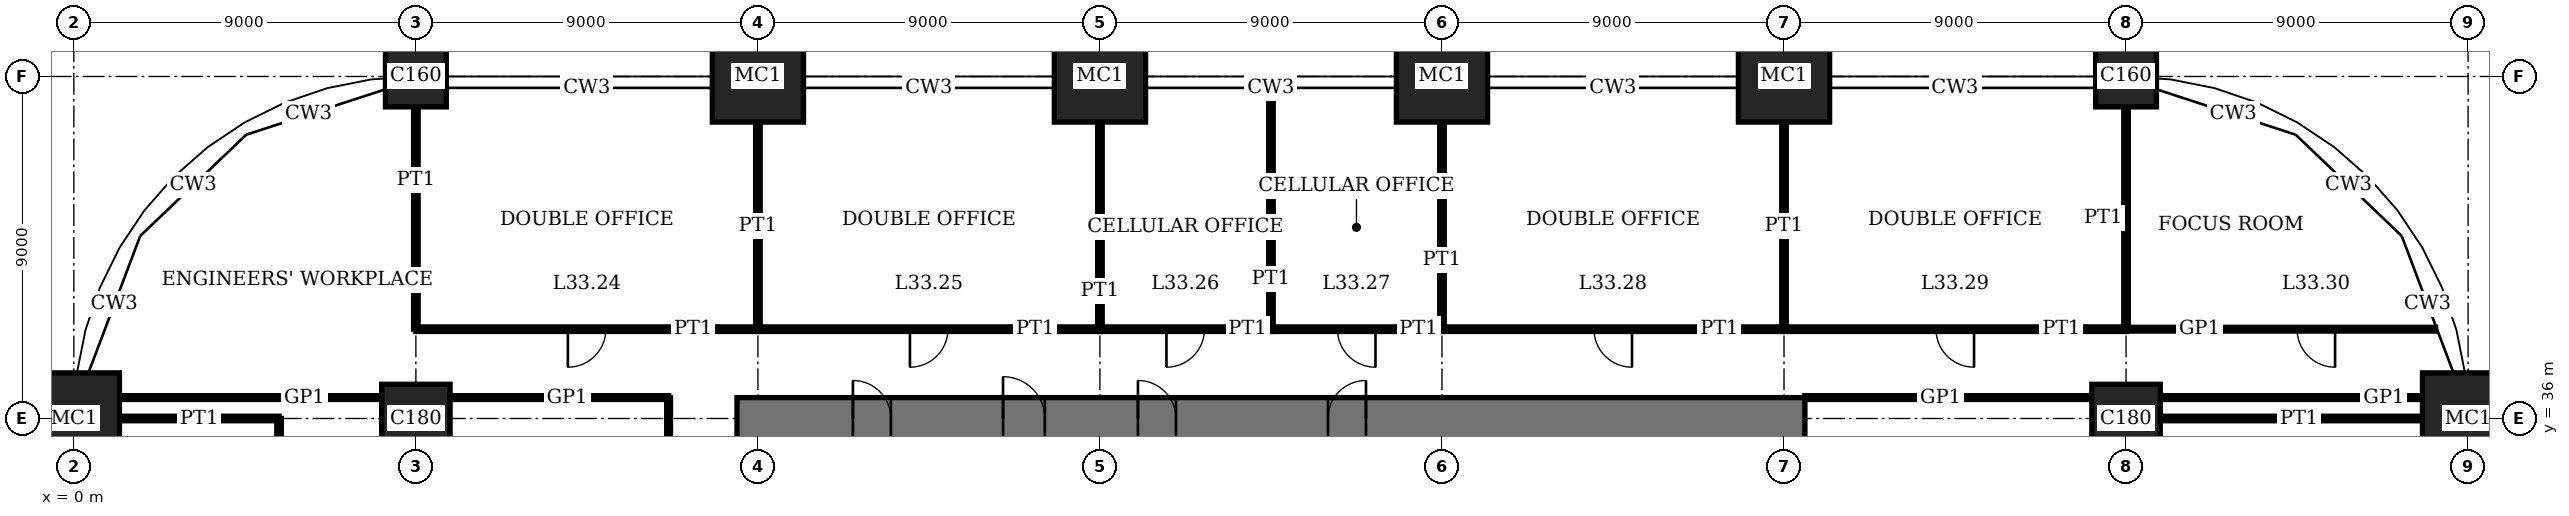
"""IFC4 building model, lengths in metres.
Left out: names, types, materials, properties, quantities, classifications, styles, units other than length and angle.
Written with IfcOpenShell. Run it as: python <this file> out.ifc"""

import sys

from ifc_helpers import new_model, si_unit, direction, frame, frame_2d, origin, origin_2d, place, context, subcontext, project, spatial, rectangle, extrude, element, fill, save


model = new_model("IFC4")
c1 = context("Model", 3, precision=1e-05, world=origin(), true_north=direction((0.0, 1.0)))
c2 = subcontext(c1, "Body", "Model", "MODEL_VIEW")
j1 = project(units=[si_unit("LENGTHUNIT", "METRE"), si_unit("PLANEANGLEUNIT", "RADIAN")], contexts=[c1])
p1 = place(None, origin())
s1 = spatial("IfcSite", under=j1, at=p1, CompositionType="ELEMENT")
p2 = place(p1, origin())
s2 = spatial("IfcBuilding", under=s1, at=p2, CompositionType="ELEMENT")
p3 = place(p2, frame((0.0, 0.0, 137.0)))
s3 = spatial("IfcBuildingStorey", under=s2, at=p3, CompositionType="ELEMENT", Elevation=137.0)
p4 = place(p3, frame((0.0, 36.0, 0.0), z_axis=(0.0, 0.0, 1.0), x_axis=(1.0, 0.0, 0.0)))
e1 = element("IfcColumn", 1, at=p4, inside=s3, PredefinedType="COLUMN", context=c2, shape_type="SweptSolid", body=[
    extrude(rectangle(XDim=2.4, YDim=2.4, at=origin_2d()), origin(), (0.0, 0.0, 1.0), 4.0),
])
p5 = place(p3, frame((9.0, 36.0, 0.0), z_axis=(0.0, 0.0, 1.0), x_axis=(1.0, 0.0, 0.0)))
e2 = element("IfcColumn", 2, at=p5, inside=s3, PredefinedType="COLUMN", context=c2, shape_type="SweptSolid", body=[
    extrude(rectangle(XDim=1.8, YDim=1.8, at=origin_2d()), origin(), (0.0, 0.0, 1.0), 4.0),
])
p6 = place(p3, frame((9.0, 45.0, 0.0), z_axis=(0.0, 0.0, 1.0), x_axis=(1.0, 0.0, 0.0)))
e3 = element("IfcColumn", 3, at=p6, inside=s3, PredefinedType="COLUMN", context=c2, shape_type="SweptSolid", body=[
    extrude(rectangle(XDim=1.6, YDim=1.6, at=origin_2d()), origin(), (0.0, 0.0, 1.0), 4.0),
])
for number, where, z_axis, x_axis in (
    (4, (18.0, 45.0, 0.0), (0.0, 0.0, 1.0), (1.0, 0.0, 0.0)),
    (5, (27.0, 45.0, 0.0), (0.0, 0.0, 1.0), (1.0, 0.0, 0.0)),
    (6, (36.0, 45.0, 0.0), (0.0, 0.0, 1.0), (1.0, 0.0, 0.0)),
    (7, (45.0, 45.0, 0.0), (0.0, 0.0, 1.0), (1.0, 0.0, 0.0)),
):
    element("IfcColumn", number, at=place(p3, frame(where, z_axis=z_axis, x_axis=x_axis)), inside=s3, PredefinedType="COLUMN", context=c2, shape_type="SweptSolid", body=[
        extrude(rectangle(XDim=2.4, YDim=2.4, at=origin_2d()), origin(), (0.0, 0.0, 1.0), 4.0),
    ])
p7 = place(p3, frame((54.0, 36.0, 0.0), z_axis=(0.0, 0.0, 1.0), x_axis=(1.0, 0.0, 0.0)))
e8 = element("IfcColumn", 8, at=p7, inside=s3, PredefinedType="COLUMN", context=c2, shape_type="SweptSolid", body=[
    extrude(rectangle(XDim=1.8, YDim=1.8, at=origin_2d()), origin(), (0.0, 0.0, 1.0), 4.0),
])
p8 = place(p3, frame((54.0, 45.0, 0.0), z_axis=(0.0, 0.0, 1.0), x_axis=(1.0, 0.0, 0.0)))
e9 = element("IfcColumn", 9, at=p8, inside=s3, PredefinedType="COLUMN", context=c2, shape_type="SweptSolid", body=[
    extrude(rectangle(XDim=1.6, YDim=1.6, at=origin_2d()), origin(), (0.0, 0.0, 1.0), 4.0),
])
p9 = place(p3, frame((63.0, 36.0, 0.0), z_axis=(0.0, 0.0, 1.0), x_axis=(1.0, 0.0, 0.0)))
e10 = element("IfcColumn", 10, at=p9, inside=s3, PredefinedType="COLUMN", context=c2, shape_type="SweptSolid", body=[
    extrude(rectangle(XDim=2.4, YDim=2.4, at=origin_2d()), origin(), (0.0, 0.0, 1.0), 4.0),
])
p10 = place(p3, frame((45.55, 36.0, 0.0), z_axis=(0.0, 0.0, 1.0), x_axis=(-1.0, 0.0, 0.0)))
e11 = element("IfcWall", 11, at=p10, inside=s3, PredefinedType="SHEAR", context=c2, shape_type="SweptSolid", body=[
    extrude(rectangle(XDim=28.1, YDim=1.1, at=frame_2d((14.05, 0.0))), origin(), (0.0, 0.0, 1.0), 4.0),
])
p11 = place(p10, frame((11.55, 0.0, 0.0)))
e12 = element("IfcOpeningElement", 12, at=p11, cuts=e11, PredefinedType="OPENING", context=c2, shape_type="SweptSolid", body=[
    extrude(rectangle(XDim=1.0, YDim=2.4, at=frame_2d((0.5, 1.2))), frame((0.0, 0.56, 0.0), z_axis=(0.0, -1.0, 0.0), x_axis=(1.0, 0.0, 0.0)), (0.0, 0.0, 1.0), 1.12),
])
p12 = place(p10, frame((16.55, 0.0, 0.0)))
e13 = element("IfcOpeningElement", 13, at=p12, cuts=e11, PredefinedType="OPENING", context=c2, shape_type="SweptSolid", body=[
    extrude(rectangle(XDim=1.0, YDim=2.4, at=frame_2d((0.5, 1.2))), frame((0.0, 0.56, 0.0), z_axis=(0.0, -1.0, 0.0), x_axis=(1.0, 0.0, 0.0)), (0.0, 0.0, 1.0), 1.12),
])
p13 = place(p10, frame((20.0, 0.0, 0.0)))
e14 = element("IfcOpeningElement", 14, at=p13, cuts=e11, PredefinedType="OPENING", context=c2, shape_type="SweptSolid", body=[
    extrude(rectangle(XDim=1.1, YDim=2.4, at=frame_2d((0.55, 1.2))), frame((0.0, 0.56, 0.0), z_axis=(0.0, -1.0, 0.0), x_axis=(1.0, 0.0, 0.0)), (0.0, 0.0, 1.0), 1.12),
])
p14 = place(p10, frame((24.05, 0.0, 0.0)))
e15 = element("IfcOpeningElement", 15, at=p14, cuts=e11, PredefinedType="OPENING", context=c2, shape_type="SweptSolid", body=[
    extrude(rectangle(XDim=1.0, YDim=2.4, at=frame_2d((0.5, 1.2))), frame((0.0, 0.56, 0.0), z_axis=(0.0, -1.0, 0.0), x_axis=(1.0, 0.0, 0.0)), (0.0, 0.0, 1.0), 1.12),
])
p15 = place(p3, frame((1.2, 36.0, 0.0), z_axis=(0.0, 0.0, 1.0), x_axis=(1.0, 0.0, 0.0)))
e16 = element("IfcWall", 16, at=p15, inside=s3, PredefinedType="PARTITIONING", context=c2, shape_type="SweptSolid", body=[
    extrude(rectangle(XDim=4.2, YDim=0.12, at=frame_2d((2.1, 0.0))), origin(), (0.0, 0.0, 1.0), 3.05),
])
p16 = place(p3, frame((54.9, 36.0, 0.0), z_axis=(0.0, 0.0, 1.0), x_axis=(1.0, 0.0, 0.0)))
e17 = element("IfcWall", 17, at=p16, inside=s3, PredefinedType="PARTITIONING", context=c2, shape_type="SweptSolid", body=[
    extrude(rectangle(XDim=6.9, YDim=0.12, at=frame_2d((3.45, 0.0))), origin(), (0.0, 0.0, 1.0), 3.05),
])
p17 = place(p3, frame((1.2, 36.55, 0.0), z_axis=(0.0, 0.0, 1.0), x_axis=(1.0, 0.0, 0.0)))
e18 = element("IfcWall", 18, at=p17, inside=s3, PredefinedType="PARTITIONING", context=c2, shape_type="SweptSolid", body=[
    extrude(rectangle(XDim=6.9, YDim=0.1, at=frame_2d((3.45, 0.0))), origin(), (0.0, 0.0, 1.0), 3.75),
])
p18 = place(p3, frame((9.9, 36.55, 0.0), z_axis=(0.0, 0.0, 1.0), x_axis=(1.0, 0.0, 0.0)))
e19 = element("IfcWall", 19, at=p18, inside=s3, PredefinedType="PARTITIONING", context=c2, shape_type="SweptSolid", body=[
    extrude(rectangle(XDim=5.75, YDim=0.1, at=frame_2d((2.875, 0.0))), origin(), (0.0, 0.0, 1.0), 3.75),
])
p19 = place(p3, frame((45.55, 36.55, 0.0), z_axis=(0.0, 0.0, 1.0), x_axis=(1.0, 0.0, 0.0)))
e20 = element("IfcWall", 20, at=p19, inside=s3, PredefinedType="PARTITIONING", context=c2, shape_type="SweptSolid", body=[
    extrude(rectangle(XDim=7.55, YDim=0.1, at=frame_2d((3.775, 0.0))), origin(), (0.0, 0.0, 1.0), 3.75),
])
p20 = place(p3, frame((54.9, 36.55, 0.0), z_axis=(0.0, 0.0, 1.0), x_axis=(1.0, 0.0, 0.0)))
e21 = element("IfcWall", 21, at=p20, inside=s3, PredefinedType="PARTITIONING", context=c2, shape_type="SweptSolid", body=[
    extrude(rectangle(XDim=6.9, YDim=0.1, at=frame_2d((3.45, 0.0))), origin(), (0.0, 0.0, 1.0), 3.75),
])
p21 = place(p3, frame((9.0, 38.35, 0.0), z_axis=(0.0, 0.0, 1.0), x_axis=(1.0, 0.0, 0.0)))
e22 = element("IfcWall", 22, at=p21, inside=s3, PredefinedType="PARTITIONING", context=c2, shape_type="SweptSolid", body=[
    extrude(rectangle(XDim=9.0, YDim=0.12, at=frame_2d((4.5, 0.0))), origin(), (0.0, 0.0, 1.0), 3.75),
])
p22 = place(p21, frame((4.0, 0.0, 0.0)))
e23 = element("IfcOpeningElement", 23, at=p22, cuts=e22, PredefinedType="OPENING", context=c2, shape_type="SweptSolid", body=[
    extrude(rectangle(XDim=1.0, YDim=2.4, at=frame_2d((0.5, 1.2))), frame((0.0, 0.07, 0.0), z_axis=(0.0, -1.0, 0.0), x_axis=(1.0, 0.0, 0.0)), (0.0, 0.0, 1.0), 0.14),
])
p23 = place(p3, frame((18.0, 38.35, 0.0), z_axis=(0.0, 0.0, 1.0), x_axis=(1.0, 0.0, 0.0)))
e24 = element("IfcWall", 24, at=p23, inside=s3, PredefinedType="PARTITIONING", context=c2, shape_type="SweptSolid", body=[
    extrude(rectangle(XDim=9.0, YDim=0.12, at=frame_2d((4.5, 0.0))), origin(), (0.0, 0.0, 1.0), 3.75),
])
p24 = place(p23, frame((4.0, 0.0, 0.0)))
e25 = element("IfcOpeningElement", 25, at=p24, cuts=e24, PredefinedType="OPENING", context=c2, shape_type="SweptSolid", body=[
    extrude(rectangle(XDim=1.0, YDim=2.4, at=frame_2d((0.5, 1.2))), frame((0.0, 0.07, 0.0), z_axis=(0.0, -1.0, 0.0), x_axis=(1.0, 0.0, 0.0)), (0.0, 0.0, 1.0), 0.14),
])
p25 = place(p3, frame((27.0, 38.35, 0.0), z_axis=(0.0, 0.0, 1.0), x_axis=(1.0, 0.0, 0.0)))
e26 = element("IfcWall", 26, at=p25, inside=s3, PredefinedType="PARTITIONING", context=c2, shape_type="SweptSolid", body=[
    extrude(rectangle(XDim=4.5, YDim=0.12, at=frame_2d((2.25, 0.0))), origin(), (0.0, 0.0, 1.0), 3.75),
])
p26 = place(p25, frame((1.75, 0.0, 0.0)))
e27 = element("IfcOpeningElement", 27, at=p26, cuts=e26, PredefinedType="OPENING", context=c2, shape_type="SweptSolid", body=[
    extrude(rectangle(XDim=1.0, YDim=2.4, at=frame_2d((0.5, 1.2))), frame((0.0, 0.07, 0.0), z_axis=(0.0, -1.0, 0.0), x_axis=(1.0, 0.0, 0.0)), (0.0, 0.0, 1.0), 0.14),
])
p27 = place(p3, frame((31.5, 38.35, 0.0), z_axis=(0.0, 0.0, 1.0), x_axis=(1.0, 0.0, 0.0)))
e28 = element("IfcWall", 28, at=p27, inside=s3, PredefinedType="PARTITIONING", context=c2, shape_type="SweptSolid", body=[
    extrude(rectangle(XDim=4.5, YDim=0.12, at=frame_2d((2.25, 0.0))), origin(), (0.0, 0.0, 1.0), 3.75),
])
p28 = place(p27, frame((1.75, 0.0, 0.0)))
e29 = element("IfcOpeningElement", 29, at=p28, cuts=e28, PredefinedType="OPENING", context=c2, shape_type="SweptSolid", body=[
    extrude(rectangle(XDim=1.0, YDim=2.4, at=frame_2d((0.5, 1.2))), frame((0.0, 0.07, 0.0), z_axis=(0.0, -1.0, 0.0), x_axis=(1.0, 0.0, 0.0)), (0.0, 0.0, 1.0), 0.14),
])
p29 = place(p3, frame((36.0, 38.35, 0.0), z_axis=(0.0, 0.0, 1.0), x_axis=(1.0, 0.0, 0.0)))
e30 = element("IfcWall", 30, at=p29, inside=s3, PredefinedType="PARTITIONING", context=c2, shape_type="SweptSolid", body=[
    extrude(rectangle(XDim=9.0, YDim=0.12, at=frame_2d((4.5, 0.0))), origin(), (0.0, 0.0, 1.0), 3.75),
])
p30 = place(p29, frame((4.0, 0.0, 0.0)))
e31 = element("IfcOpeningElement", 31, at=p30, cuts=e30, PredefinedType="OPENING", context=c2, shape_type="SweptSolid", body=[
    extrude(rectangle(XDim=1.0, YDim=2.4, at=frame_2d((0.5, 1.2))), frame((0.0, 0.07, 0.0), z_axis=(0.0, -1.0, 0.0), x_axis=(1.0, 0.0, 0.0)), (0.0, 0.0, 1.0), 0.14),
])
p31 = place(p3, frame((45.0, 38.35, 0.0), z_axis=(0.0, 0.0, 1.0), x_axis=(1.0, 0.0, 0.0)))
e32 = element("IfcWall", 32, at=p31, inside=s3, PredefinedType="PARTITIONING", context=c2, shape_type="SweptSolid", body=[
    extrude(rectangle(XDim=9.0, YDim=0.12, at=frame_2d((4.5, 0.0))), origin(), (0.0, 0.0, 1.0), 3.75),
])
p32 = place(p31, frame((4.0, 0.0, 0.0)))
e33 = element("IfcOpeningElement", 33, at=p32, cuts=e32, PredefinedType="OPENING", context=c2, shape_type="SweptSolid", body=[
    extrude(rectangle(XDim=1.0, YDim=2.4, at=frame_2d((0.5, 1.2))), frame((0.0, 0.07, 0.0), z_axis=(0.0, -1.0, 0.0), x_axis=(1.0, 0.0, 0.0)), (0.0, 0.0, 1.0), 0.14),
])
p33 = place(p3, frame((54.0, 38.35, 0.0), z_axis=(0.0, 0.0, 1.0), x_axis=(1.0, 0.0, 0.0)))
e34 = element("IfcWall", 34, at=p33, inside=s3, PredefinedType="PARTITIONING", context=c2, shape_type="SweptSolid", body=[
    extrude(rectangle(XDim=8.146, YDim=0.1, at=frame_2d((4.073, 0.0))), origin(), (0.0, 0.0, 1.0), 3.75),
])
p34 = place(p33, frame((4.5, 0.0, 0.0)))
e35 = element("IfcOpeningElement", 35, at=p34, cuts=e34, PredefinedType="OPENING", context=c2, shape_type="SweptSolid", body=[
    extrude(rectangle(XDim=1.0, YDim=2.4, at=frame_2d((0.5, 1.2))), frame((0.0, 0.06, 0.0), z_axis=(0.0, -1.0, 0.0), x_axis=(1.0, 0.0, 0.0)), (0.0, 0.0, 1.0), 0.12),
])
p35 = place(p3, frame((5.4, 31.5, 0.0), z_axis=(0.0, 0.0, 1.0), x_axis=(0.0, 1.0, 0.0)))
e36 = element("IfcWall", 36, at=p35, inside=s3, PredefinedType="PARTITIONING", context=c2, shape_type="SweptSolid", body=[
    extrude(rectangle(XDim=4.5, YDim=0.12, at=frame_2d((2.25, 0.0))), origin(), (0.0, 0.0, 1.0), 3.75),
])
p36 = place(p35, frame((1.75, 0.0, 0.0)))
e37 = element("IfcOpeningElement", 37, at=p36, cuts=e36, PredefinedType="OPENING", context=c2, shape_type="SweptSolid", body=[
    extrude(rectangle(XDim=1.0, YDim=2.4, at=frame_2d((0.5, 1.2))), frame((0.0, 0.07, 0.0), z_axis=(0.0, -1.0, 0.0), x_axis=(1.0, 0.0, 0.0)), (0.0, 0.0, 1.0), 0.14),
])
p37 = place(p3, frame((9.0, 38.35, 0.0), z_axis=(0.0, 0.0, 1.0), x_axis=(0.0, 1.0, 0.0)))
e38 = element("IfcWall", 38, at=p37, inside=s3, PredefinedType="PARTITIONING", context=c2, shape_type="SweptSolid", body=[
    extrude(rectangle(XDim=5.85, YDim=0.12, at=frame_2d((2.925, 0.0))), origin(), (0.0, 0.0, 1.0), 3.05),
])
p38 = place(p3, frame((15.65, 27.0, 0.0), z_axis=(0.0, 0.0, 1.0), x_axis=(0.0, 1.0, 0.0)))
e39 = element("IfcWall", 39, at=p38, inside=s3, PredefinedType="PARTITIONING", context=c2, shape_type="SweptSolid", body=[
    extrude(rectangle(XDim=9.55, YDim=0.1, at=frame_2d((4.775, 0.0))), origin(), (0.0, 0.0, 1.0), 3.75),
])
for number, where, z_axis, x_axis in (
    (40, (18.0, 38.35, 0.0), (0.0, 0.0, 1.0), (0.0, 1.0, 0.0)),
    (41, (27.0, 38.35, 0.0), (0.0, 0.0, 1.0), (0.0, 1.0, 0.0)),
):
    element("IfcWall", number, at=place(p3, frame(where, z_axis=z_axis, x_axis=x_axis)), inside=s3, PredefinedType="PARTITIONING", context=c2, shape_type="SweptSolid", body=[
        extrude(rectangle(XDim=5.45, YDim=0.12, at=frame_2d((2.725, 0.0))), origin(), (0.0, 0.0, 1.0), 3.05),
    ])
p39 = place(p3, frame((31.5, 38.35, 0.0), z_axis=(0.0, 0.0, 1.0), x_axis=(0.0, 1.0, 0.0)))
e42 = element("IfcWall", 42, at=p39, inside=s3, PredefinedType="PARTITIONING", context=c2, shape_type="SweptSolid", body=[
    extrude(rectangle(XDim=6.34, YDim=0.12, at=frame_2d((3.17, 0.0))), origin(), (0.0, 0.0, 1.0), 3.75),
])
for number, where, z_axis, x_axis in (
    (43, (36.0, 38.35, 0.0), (0.0, 0.0, 1.0), (0.0, 1.0, 0.0)),
    (44, (45.0, 38.35, 0.0), (0.0, 0.0, 1.0), (0.0, 1.0, 0.0)),
):
    element("IfcWall", number, at=place(p3, frame(where, z_axis=z_axis, x_axis=x_axis)), inside=s3, PredefinedType="PARTITIONING", context=c2, shape_type="SweptSolid", body=[
        extrude(rectangle(XDim=5.45, YDim=0.12, at=frame_2d((2.725, 0.0))), origin(), (0.0, 0.0, 1.0), 3.05),
    ])
p40 = place(p3, frame((54.0, 38.35, 0.0), z_axis=(0.0, 0.0, 1.0), x_axis=(0.0, 1.0, 0.0)))
e45 = element("IfcWall", 45, at=p40, inside=s3, PredefinedType="PARTITIONING", context=c2, shape_type="SweptSolid", body=[
    extrude(rectangle(XDim=5.85, YDim=0.12, at=frame_2d((2.925, 0.0))), origin(), (0.0, 0.0, 1.0), 3.05),
])
p41 = place(p11, origin())
e46 = element("IfcDoor", 46, at=p41, inside=s3, OperationType="SINGLE_SWING_LEFT", PredefinedType="DOOR", context=c2, shape_type="SweptSolid", body=[
    extrude(rectangle(XDim=1.0, YDim=2.4, at=frame_2d((0.5, 1.2))), frame((0.0, 0.025, 0.0), z_axis=(0.0, -1.0, 0.0), x_axis=(1.0, 0.0, 0.0)), (0.0, 0.0, 1.0), 0.05),
    extrude(rectangle(XDim=0.04, YDim=2.4, at=frame_2d((0.02, 1.2))), frame((0.0, 0.4, 0.0), z_axis=(0.0, -1.0, 0.0), x_axis=(1.0, 0.0, 0.0)), (0.0, 0.0, 1.0), 0.8),
    extrude(rectangle(XDim=0.04, YDim=2.4, at=frame_2d((0.98, 1.2))), frame((0.0, 0.4, 0.0), z_axis=(0.0, -1.0, 0.0), x_axis=(1.0, 0.0, 0.0)), (0.0, 0.0, 1.0), 0.8),
    extrude(rectangle(XDim=1.0, YDim=0.04, at=frame_2d((0.5, 2.38))), frame((0.0, 0.4, 0.0), z_axis=(0.0, -1.0, 0.0), x_axis=(1.0, 0.0, 0.0)), (0.0, 0.0, 1.0), 0.8),
])
fill(e12, e46)
p42 = place(p12, origin())
e47 = element("IfcDoor", 47, at=p42, inside=s3, OperationType="SINGLE_SWING_RIGHT", PredefinedType="DOOR", context=c2, shape_type="SweptSolid", body=[
    extrude(rectangle(XDim=1.0, YDim=2.4, at=frame_2d((0.5, 1.2))), frame((0.0, 0.025, 0.0), z_axis=(0.0, -1.0, 0.0), x_axis=(1.0, 0.0, 0.0)), (0.0, 0.0, 1.0), 0.05),
    extrude(rectangle(XDim=0.04, YDim=2.4, at=frame_2d((0.02, 1.2))), frame((0.0, 0.4, 0.0), z_axis=(0.0, -1.0, 0.0), x_axis=(1.0, 0.0, 0.0)), (0.0, 0.0, 1.0), 0.8),
    extrude(rectangle(XDim=0.04, YDim=2.4, at=frame_2d((0.98, 1.2))), frame((0.0, 0.4, 0.0), z_axis=(0.0, -1.0, 0.0), x_axis=(1.0, 0.0, 0.0)), (0.0, 0.0, 1.0), 0.8),
    extrude(rectangle(XDim=1.0, YDim=0.04, at=frame_2d((0.5, 2.38))), frame((0.0, 0.4, 0.0), z_axis=(0.0, -1.0, 0.0), x_axis=(1.0, 0.0, 0.0)), (0.0, 0.0, 1.0), 0.8),
])
fill(e13, e47)
p43 = place(p13, origin())
e48 = element("IfcDoor", 48, at=p43, inside=s3, OperationType="SINGLE_SWING_RIGHT", PredefinedType="DOOR", context=c2, shape_type="SweptSolid", body=[
    extrude(rectangle(XDim=1.1, YDim=2.4, at=frame_2d((0.55, 1.2))), frame((0.0, 0.025, 0.0), z_axis=(0.0, -1.0, 0.0), x_axis=(1.0, 0.0, 0.0)), (0.0, 0.0, 1.0), 0.05),
    extrude(rectangle(XDim=0.04, YDim=2.4, at=frame_2d((0.02, 1.2))), frame((0.0, 0.44, 0.0), z_axis=(0.0, -1.0, 0.0), x_axis=(1.0, 0.0, 0.0)), (0.0, 0.0, 1.0), 0.88),
    extrude(rectangle(XDim=0.04, YDim=2.4, at=frame_2d((1.08, 1.2))), frame((0.0, 0.44, 0.0), z_axis=(0.0, -1.0, 0.0), x_axis=(1.0, 0.0, 0.0)), (0.0, 0.0, 1.0), 0.88),
    extrude(rectangle(XDim=1.1, YDim=0.04, at=frame_2d((0.55, 2.38))), frame((0.0, 0.44, 0.0), z_axis=(0.0, -1.0, 0.0), x_axis=(1.0, 0.0, 0.0)), (0.0, 0.0, 1.0), 0.88),
])
fill(e14, e48)
p44 = place(p14, origin())
e49 = element("IfcDoor", 49, at=p44, inside=s3, OperationType="SINGLE_SWING_RIGHT", PredefinedType="DOOR", context=c2, shape_type="SweptSolid", body=[
    extrude(rectangle(XDim=1.0, YDim=2.4, at=frame_2d((0.5, 1.2))), frame((0.0, 0.025, 0.0), z_axis=(0.0, -1.0, 0.0), x_axis=(1.0, 0.0, 0.0)), (0.0, 0.0, 1.0), 0.05),
    extrude(rectangle(XDim=0.04, YDim=2.4, at=frame_2d((0.02, 1.2))), frame((0.0, 0.4, 0.0), z_axis=(0.0, -1.0, 0.0), x_axis=(1.0, 0.0, 0.0)), (0.0, 0.0, 1.0), 0.8),
    extrude(rectangle(XDim=0.04, YDim=2.4, at=frame_2d((0.98, 1.2))), frame((0.0, 0.4, 0.0), z_axis=(0.0, -1.0, 0.0), x_axis=(1.0, 0.0, 0.0)), (0.0, 0.0, 1.0), 0.8),
    extrude(rectangle(XDim=1.0, YDim=0.04, at=frame_2d((0.5, 2.38))), frame((0.0, 0.4, 0.0), z_axis=(0.0, -1.0, 0.0), x_axis=(1.0, 0.0, 0.0)), (0.0, 0.0, 1.0), 0.8),
])
fill(e15, e49)
p45 = place(p22, origin())
e50 = element("IfcDoor", 50, at=p45, inside=s3, OperationType="SINGLE_SWING_LEFT", PredefinedType="DOOR", context=c2, shape_type="SweptSolid", body=[
    extrude(rectangle(XDim=1.0, YDim=2.4, at=frame_2d((0.5, 1.2))), frame((0.0, 0.025, 0.0), z_axis=(0.0, -1.0, 0.0), x_axis=(1.0, 0.0, 0.0)), (0.0, 0.0, 1.0), 0.05),
])
fill(e23, e50)
p46 = place(p24, origin())
e51 = element("IfcDoor", 51, at=p46, inside=s3, OperationType="SINGLE_SWING_LEFT", PredefinedType="DOOR", context=c2, shape_type="SweptSolid", body=[
    extrude(rectangle(XDim=1.0, YDim=2.4, at=frame_2d((0.5, 1.2))), frame((0.0, 0.025, 0.0), z_axis=(0.0, -1.0, 0.0), x_axis=(1.0, 0.0, 0.0)), (0.0, 0.0, 1.0), 0.05),
])
fill(e25, e51)
p47 = place(p26, origin())
e52 = element("IfcDoor", 52, at=p47, inside=s3, OperationType="SINGLE_SWING_LEFT", PredefinedType="DOOR", context=c2, shape_type="SweptSolid", body=[
    extrude(rectangle(XDim=1.0, YDim=2.4, at=frame_2d((0.5, 1.2))), frame((0.0, 0.025, 0.0), z_axis=(0.0, -1.0, 0.0), x_axis=(1.0, 0.0, 0.0)), (0.0, 0.0, 1.0), 0.05),
])
fill(e27, e52)
p48 = place(p28, origin())
e53 = element("IfcDoor", 53, at=p48, inside=s3, OperationType="SINGLE_SWING_RIGHT", PredefinedType="DOOR", context=c2, shape_type="SweptSolid", body=[
    extrude(rectangle(XDim=1.0, YDim=2.4, at=frame_2d((0.5, 1.2))), frame((0.0, 0.025, 0.0), z_axis=(0.0, -1.0, 0.0), x_axis=(1.0, 0.0, 0.0)), (0.0, 0.0, 1.0), 0.05),
])
fill(e29, e53)
p49 = place(p30, origin())
e54 = element("IfcDoor", 54, at=p49, inside=s3, OperationType="SINGLE_SWING_RIGHT", PredefinedType="DOOR", context=c2, shape_type="SweptSolid", body=[
    extrude(rectangle(XDim=1.0, YDim=2.4, at=frame_2d((0.5, 1.2))), frame((0.0, 0.025, 0.0), z_axis=(0.0, -1.0, 0.0), x_axis=(1.0, 0.0, 0.0)), (0.0, 0.0, 1.0), 0.05),
])
fill(e31, e54)
p50 = place(p32, origin())
e55 = element("IfcDoor", 55, at=p50, inside=s3, OperationType="SINGLE_SWING_RIGHT", PredefinedType="DOOR", context=c2, shape_type="SweptSolid", body=[
    extrude(rectangle(XDim=1.0, YDim=2.4, at=frame_2d((0.5, 1.2))), frame((0.0, 0.025, 0.0), z_axis=(0.0, -1.0, 0.0), x_axis=(1.0, 0.0, 0.0)), (0.0, 0.0, 1.0), 0.05),
])
fill(e33, e55)
p51 = place(p34, origin())
e56 = element("IfcDoor", 56, at=p51, inside=s3, OperationType="SINGLE_SWING_RIGHT", PredefinedType="DOOR", context=c2, shape_type="SweptSolid", body=[
    extrude(rectangle(XDim=1.0, YDim=2.4, at=frame_2d((0.5, 1.2))), frame((0.0, 0.02, 0.0), z_axis=(0.0, -1.0, 0.0), x_axis=(1.0, 0.0, 0.0)), (0.0, 0.0, 1.0), 0.04),
])
fill(e35, e56)
save(model, sys.argv[1])
